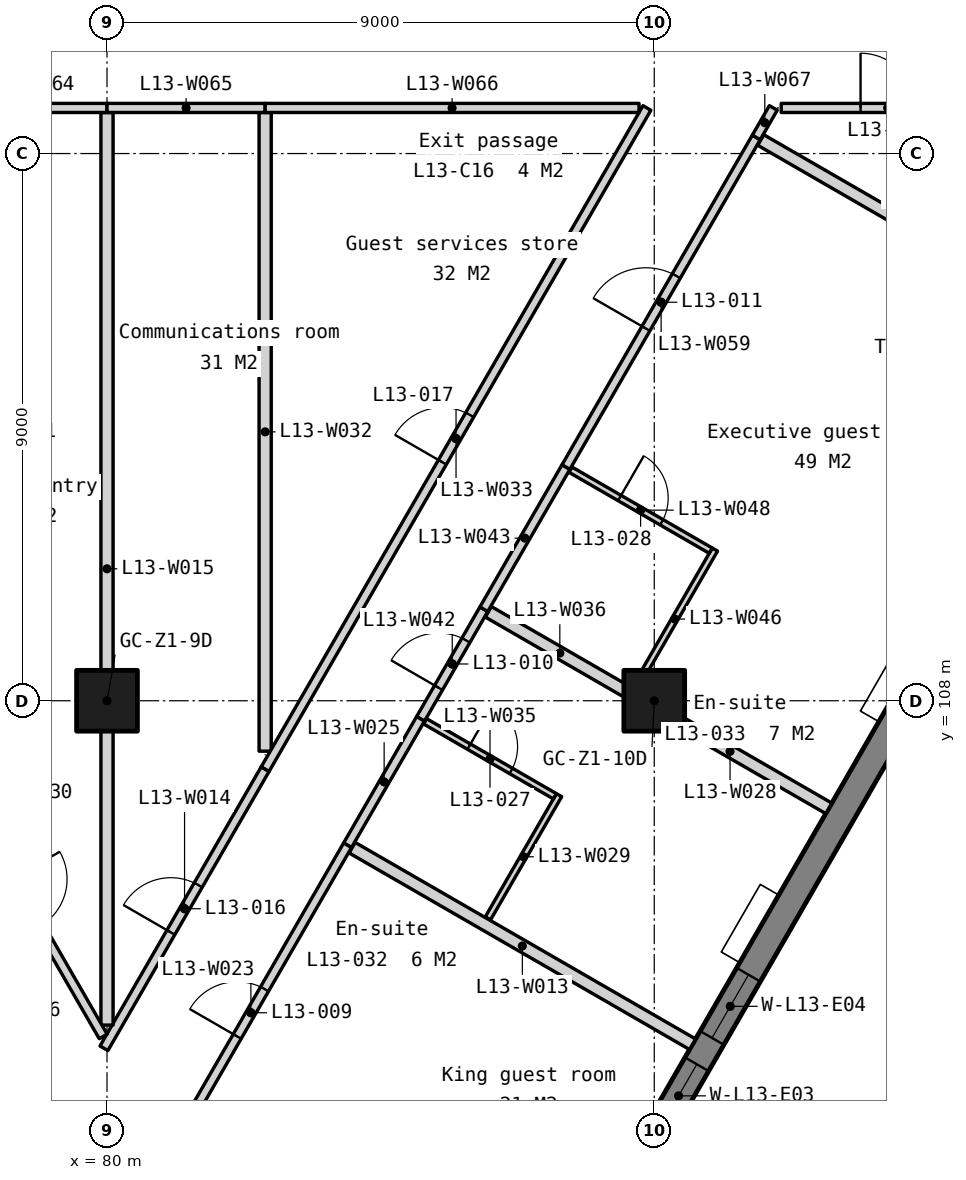
"""IFC4 building model, lengths in metres.
Left out: names, types, materials, properties, quantities, classifications, styles, units other than length and angle.
Written with IfcOpenShell. Run it as: python <this file> out.ifc"""

import sys

from ifc_helpers import new_model, si_unit, direction, frame, frame_2d, origin, origin_2d, place, context, subcontext, project, spatial, polyline, rectangle, outline, extrude, element, fill, save


model = new_model("IFC4")
c1 = context("Model", 3, precision=1e-05, world=origin(), true_north=direction((0.0, 1.0)))
c2 = subcontext(c1, "Body", "Model", "MODEL_VIEW")
j1 = project(units=[si_unit("LENGTHUNIT", "METRE"), si_unit("PLANEANGLEUNIT", "RADIAN")], contexts=[c1])
p1 = place(None, origin())
s1 = spatial("IfcSite", under=j1, at=p1, CompositionType="ELEMENT")
p2 = place(p1, origin())
s2 = spatial("IfcBuilding", under=s1, at=p2, CompositionType="ELEMENT")
p3 = place(p2, frame((0.0, 0.0, 59.5)))
s3 = spatial("IfcBuildingStorey", under=s2, at=p3, CompositionType="ELEMENT", Elevation=59.5)
for number, where, z_axis, x_axis in (
    (1, (80.0, 108.0, 0.0), (0.0, 0.0, 1.0), (1.0, 0.0, 0.0)),
    (2, (89.0, 108.0, 0.0), (0.0, 0.0, 1.0), (1.0, 0.0, 0.0)),
):
    element("IfcColumn", number, at=place(p3, frame(where, z_axis=z_axis, x_axis=x_axis)), inside=s3, PredefinedType="COLUMN", context=c2, shape_type="SweptSolid", body=[
        extrude(rectangle(XDim=1.0, YDim=1.0, at=origin_2d()), origin(), (0.0, 0.0, 1.0), 3.5),
    ])
p4 = place(p3, frame((83.105, 90.599, -0.15), z_axis=(0.0, 0.0, 1.0), x_axis=(0.499999201451, 0.866025864826, 0.0)))
e3 = element("IfcWall", 3, at=p4, inside=s3, PredefinedType="SOLIDWALL", context=c2, shape_type="SweptSolid", body=[
    extrude(outline(polyline([(44.8, 0.0), (44.8, 3.5), (0.0, 3.5), (0.0, 0.0), (44.8, 0.0)])), frame((0.0, 0.225, 0.0), z_axis=(0.0, -1.0, 0.0), x_axis=(1.0, 0.0, 0.0)), (0.0, 0.0, 1.0), 0.45),
])
p5 = place(p4, frame((3.03, 0.0, 1.05)))
e4 = element("IfcOpeningElement", 4, at=p5, cuts=e3, PredefinedType="OPENING", context=c2, shape_type="SweptSolid", body=[
    extrude(rectangle(XDim=1.2, YDim=1.5, at=frame_2d((0.6, 0.75))), frame((0.0, 0.235, 0.0), z_axis=(0.0, -1.0, 0.0), x_axis=(1.0, 0.0, 0.0)), (0.0, 0.0, 1.0), 0.47),
])
p6 = place(p4, frame((4.73, 0.0, 1.05)))
e5 = element("IfcOpeningElement", 5, at=p6, cuts=e3, PredefinedType="OPENING", context=c2, shape_type="SweptSolid", body=[
    extrude(rectangle(XDim=1.2, YDim=1.5, at=frame_2d((0.6, 0.75))), frame((0.0, 0.235, 0.0), z_axis=(0.0, -1.0, 0.0), x_axis=(1.0, 0.0, 0.0)), (0.0, 0.0, 1.0), 0.47),
])
p7 = place(p4, frame((11.99, 0.0, 1.05)))
e6 = element("IfcOpeningElement", 6, at=p7, cuts=e3, PredefinedType="OPENING", context=c2, shape_type="SweptSolid", body=[
    extrude(rectangle(XDim=1.2, YDim=1.5, at=frame_2d((0.6, 0.75))), frame((0.0, 0.235, 0.0), z_axis=(0.0, -1.0, 0.0), x_axis=(1.0, 0.0, 0.0)), (0.0, 0.0, 1.0), 0.47),
])
p8 = place(p4, frame((13.69, 0.0, 1.05)))
e7 = element("IfcOpeningElement", 7, at=p8, cuts=e3, PredefinedType="OPENING", context=c2, shape_type="SweptSolid", body=[
    extrude(rectangle(XDim=1.2, YDim=1.5, at=frame_2d((0.6, 0.75))), frame((0.0, 0.235, 0.0), z_axis=(0.0, -1.0, 0.0), x_axis=(1.0, 0.0, 0.0)), (0.0, 0.0, 1.0), 0.47),
])
p9 = place(p4, frame((20.95, 0.0, 1.05)))
e8 = element("IfcOpeningElement", 8, at=p9, cuts=e3, PredefinedType="OPENING", context=c2, shape_type="SweptSolid", body=[
    extrude(rectangle(XDim=1.2, YDim=1.5, at=frame_2d((0.6, 0.75))), frame((0.0, 0.235, 0.0), z_axis=(0.0, -1.0, 0.0), x_axis=(1.0, 0.0, 0.0)), (0.0, 0.0, 1.0), 0.47),
])
p10 = place(p4, frame((22.65, 0.0, 1.05)))
e9 = element("IfcOpeningElement", 9, at=p10, cuts=e3, PredefinedType="OPENING", context=c2, shape_type="SweptSolid", body=[
    extrude(rectangle(XDim=1.2, YDim=1.5, at=frame_2d((0.6, 0.75))), frame((0.0, 0.235, 0.0), z_axis=(0.0, -1.0, 0.0), x_axis=(1.0, 0.0, 0.0)), (0.0, 0.0, 1.0), 0.47),
])
p11 = place(p4, frame((29.91, 0.0, 1.05)))
e10 = element("IfcOpeningElement", 10, at=p11, cuts=e3, PredefinedType="OPENING", context=c2, shape_type="SweptSolid", body=[
    extrude(rectangle(XDim=1.2, YDim=1.5, at=frame_2d((0.6, 0.75))), frame((0.0, 0.235, 0.0), z_axis=(0.0, -1.0, 0.0), x_axis=(1.0, 0.0, 0.0)), (0.0, 0.0, 1.0), 0.47),
])
p12 = place(p4, frame((31.61, 0.0, 1.05)))
e11 = element("IfcOpeningElement", 11, at=p12, cuts=e3, PredefinedType="OPENING", context=c2, shape_type="SweptSolid", body=[
    extrude(rectangle(XDim=1.2, YDim=1.5, at=frame_2d((0.6, 0.75))), frame((0.0, 0.235, 0.0), z_axis=(0.0, -1.0, 0.0), x_axis=(1.0, 0.0, 0.0)), (0.0, 0.0, 1.0), 0.47),
])
p13 = place(p4, frame((38.87, 0.0, 1.05)))
e12 = element("IfcOpeningElement", 12, at=p13, cuts=e3, PredefinedType="OPENING", context=c2, shape_type="SweptSolid", body=[
    extrude(rectangle(XDim=1.2, YDim=1.5, at=frame_2d((0.6, 0.75))), frame((0.0, 0.235, 0.0), z_axis=(0.0, -1.0, 0.0), x_axis=(1.0, 0.0, 0.0)), (0.0, 0.0, 1.0), 0.47),
])
p14 = place(p4, frame((40.57, 0.0, 1.05)))
e13 = element("IfcOpeningElement", 13, at=p14, cuts=e3, PredefinedType="OPENING", context=c2, shape_type="SweptSolid", body=[
    extrude(rectangle(XDim=1.2, YDim=1.5, at=frame_2d((0.6, 0.75))), frame((0.0, 0.235, 0.0), z_axis=(0.0, -1.0, 0.0), x_axis=(1.0, 0.0, 0.0)), (0.0, 0.0, 1.0), 0.47),
])
p15 = place(p3, frame((76.042, 105.626, 0.0), z_axis=(0.0, 0.0, 1.0), x_axis=(0.499991405182, -0.866030365948, 0.0)))
e14 = element("IfcWall", 14, at=p15, inside=s3, PredefinedType="PARTITIONING", context=c2, shape_type="SweptSolid", body=[
    extrude(rectangle(XDim=6.496, YDim=0.15, at=frame_2d((3.248, 0.0))), origin(), (0.0, 0.0, 1.0), 3.35),
])
p16 = place(p15, frame((2.798, 0.0, 0.0)))
e15 = element("IfcOpeningElement", 15, at=p16, cuts=e14, PredefinedType="OPENING", context=c2, shape_type="SweptSolid", body=[
    extrude(rectangle(XDim=0.9, YDim=2.1, at=frame_2d((0.45, 1.05))), frame((0.0, 0.085, 0.0), z_axis=(0.0, -1.0, 0.0), x_axis=(1.0, 0.0, 0.0)), (0.0, 0.0, 1.0), 0.17),
])
p17 = place(p3, frame((84.031, 105.583, 0.0), z_axis=(0.0, 0.0, 1.0), x_axis=(0.866015162859, -0.500017737384, 0.0)))
e16 = element("IfcWall", 16, at=p17, inside=s3, PredefinedType="PARTITIONING", context=c2, shape_type="SweptSolid", body=[
    extrude(rectangle(XDim=6.465, YDim=0.2, at=frame_2d((3.232, 0.0))), origin(), (0.0, 0.0, 1.0), 3.35),
])
p18 = place(p3, frame((79.95, 102.284, 0.0), z_axis=(0.0, 0.0, 1.0), x_axis=(0.500026712466, 0.866009980786, 0.0)))
e17 = element("IfcWall", 17, at=p18, inside=s3, PredefinedType="PARTITIONING", context=c2, shape_type="SweptSolid", body=[
    extrude(rectangle(XDim=5.302, YDim=0.15, at=frame_2d((2.651, 0.0))), origin(), (0.0, 0.0, 1.0), 3.35),
])
p19 = place(p18, frame((2.201, 0.0, 0.0)))
e18 = element("IfcOpeningElement", 18, at=p19, cuts=e17, PredefinedType="OPENING", context=c2, shape_type="SweptSolid", body=[
    extrude(rectangle(XDim=0.9, YDim=2.1, at=frame_2d((0.45, 1.05))), frame((0.0, 0.085, 0.0), z_axis=(0.0, -1.0, 0.0), x_axis=(1.0, 0.0, 0.0)), (0.0, 0.0, 1.0), 0.17),
])
p20 = place(p3, frame((80.0, 102.666, 0.0), z_axis=(0.0, 0.0, 1.0), x_axis=(0.0, 1.0, 0.0)))
e19 = element("IfcWall", 19, at=p20, inside=s3, PredefinedType="PARTITIONING", context=c2, shape_type="SweptSolid", body=[
    extrude(rectangle(XDim=15.01, YDim=0.2, at=frame_2d((7.505, 0.0))), origin(), (0.0, 0.0, 1.0), 2.801),
])
p21 = place(p3, frame((80.775, 100.113, 0.0), z_axis=(0.0, 0.0, 1.0), x_axis=(0.5000079448, 0.866020816803, 0.0)))
e20 = element("IfcWall", 20, at=p21, inside=s3, PredefinedType="PARTITIONING", context=c2, shape_type="SweptSolid", body=[
    extrude(rectangle(XDim=6.366, YDim=0.15, at=frame_2d((3.183, 0.0))), origin(), (0.0, 0.0, 1.0), 3.35),
])
p22 = place(p21, frame((2.733, 0.0, 0.0)))
e21 = element("IfcOpeningElement", 21, at=p22, cuts=e20, PredefinedType="OPENING", context=c2, shape_type="SweptSolid", body=[
    extrude(rectangle(XDim=0.9, YDim=2.1, at=frame_2d((0.45, 1.05))), frame((0.0, 0.085, 0.0), z_axis=(0.0, -1.0, 0.0), x_axis=(1.0, 0.0, 0.0)), (0.0, 0.0, 1.0), 0.17),
])
p23 = place(p3, frame((83.958, 105.626, 0.0), z_axis=(0.0, 0.0, 1.0), x_axis=(0.500001309137, 0.866024647952, 0.0)))
e22 = element("IfcWall", 22, at=p23, inside=s3, PredefinedType="PARTITIONING", context=c2, shape_type="SweptSolid", body=[
    extrude(rectangle(XDim=2.4, YDim=0.15, at=frame_2d((1.2, 0.0))), origin(), (0.0, 0.0, 1.0), 3.35),
])
p24 = place(p3, frame((88.623, 108.105, 0.0), z_axis=(0.0, 0.0, 1.0), x_axis=(0.866022959057, -0.500004234368, 0.0)))
e23 = element("IfcWall", 23, at=p24, inside=s3, PredefinedType="PARTITIONING", context=c2, shape_type="SweptSolid", body=[
    extrude(rectangle(XDim=3.75, YDim=0.2, at=frame_2d((1.875, 0.0))), origin(), (0.0, 0.0, 1.0), 3.35),
])
p25 = place(p3, frame((86.264, 104.421, 0.0), z_axis=(0.0, 0.0, 1.0), x_axis=(0.500032503492, 0.866006637072, 0.0)))
e24 = element("IfcWall", 24, at=p25, inside=s3, PredefinedType="PARTITIONING", context=c2, shape_type="SweptSolid", body=[
    extrude(rectangle(XDim=2.34, YDim=0.1, at=frame_2d((1.17, 0.0))), origin(), (0.0, 0.0, 1.0), 3.35),
])
p26 = place(p3, frame((77.399, 106.875, 0.0), z_axis=(0.0, 0.0, 1.0), x_axis=(0.500017996867, -0.866015013039, 0.0)))
e25 = element("IfcWall", 25, at=p26, inside=s3, PredefinedType="PARTITIONING", context=c2, shape_type="SweptSolid", body=[
    extrude(rectangle(XDim=5.077, YDim=0.15, at=frame_2d((2.539, 0.0))), origin(), (0.0, 0.0, 1.0), 3.35),
])
p27 = place(p26, frame((2.088, 0.0, 0.0)))
e26 = element("IfcOpeningElement", 26, at=p27, cuts=e25, PredefinedType="OPENING", context=c2, shape_type="SweptSolid", body=[
    extrude(rectangle(XDim=0.9, YDim=2.1, at=frame_2d((0.45, 1.05))), frame((0.0, 0.085, 0.0), z_axis=(0.0, -1.0, 0.0), x_axis=(1.0, 0.0, 0.0)), (0.0, 0.0, 1.0), 0.17),
])
p28 = place(p3, frame((82.601, 107.171, 0.0), z_axis=(0.0, 0.0, 1.0), x_axis=(0.0, 1.0, 0.0)))
e27 = element("IfcWall", 27, at=p28, inside=s3, PredefinedType="PARTITIONING", context=c2, shape_type="SweptSolid", body=[
    extrude(rectangle(XDim=10.504, YDim=0.2, at=frame_2d((5.252, 0.0))), origin(), (0.0, 0.0, 1.0), 3.35),
])
p29 = place(p3, frame((82.601, 106.875, 0.0), z_axis=(0.0, 0.0, 1.0), x_axis=(0.499995104884, 0.866028229963, 0.0)))
e28 = element("IfcWall", 28, at=p29, inside=s3, PredefinedType="PARTITIONING", context=c2, shape_type="SweptSolid", body=[
    extrude(rectangle(XDim=12.557, YDim=0.15, at=frame_2d((6.278, 0.0))), origin(), (0.0, 0.0, 1.0), 3.35),
])
p30 = place(p29, frame((5.828, 0.0, 0.0)))
e29 = element("IfcOpeningElement", 29, at=p30, cuts=e28, PredefinedType="OPENING", context=c2, shape_type="SweptSolid", body=[
    extrude(rectangle(XDim=0.9, YDim=2.1, at=frame_2d((0.45, 1.05))), frame((0.0, 0.085, 0.0), z_axis=(0.0, -1.0, 0.0), x_axis=(1.0, 0.0, 0.0)), (0.0, 0.0, 1.0), 0.17),
])
p31 = place(p3, frame((85.231, 107.662, 0.0), z_axis=(0.0, 0.0, 1.0), x_axis=(0.866040446274, -0.499973944738, 0.0)))
e30 = element("IfcWall", 30, at=p31, inside=s3, PredefinedType="PARTITIONING", context=c2, shape_type="SweptSolid", body=[
    extrude(rectangle(XDim=2.465, YDim=0.1, at=frame_2d((1.232, 0.0))), origin(), (0.0, 0.0, 1.0), 3.35),
])
p32 = place(p31, frame((0.833, 0.0, 0.0)))
e31 = element("IfcOpeningElement", 31, at=p32, cuts=e30, PredefinedType="OPENING", context=c2, shape_type="SweptSolid", body=[
    extrude(rectangle(XDim=0.8, YDim=2.1, at=frame_2d((0.4, 1.05))), frame((0.0, 0.06, 0.0), z_axis=(0.0, -1.0, 0.0), x_axis=(1.0, 0.0, 0.0)), (0.0, 0.0, 1.0), 0.12),
])
p33 = place(p3, frame((86.271, 109.463, 0.0), z_axis=(0.0, 0.0, 1.0), x_axis=(0.866043331744, -0.499968946578, 0.0)))
e32 = element("IfcWall", 32, at=p33, inside=s3, PredefinedType="PARTITIONING", context=c2, shape_type="SweptSolid", body=[
    extrude(rectangle(XDim=2.715, YDim=0.2, at=frame_2d((1.357, 0.0))), origin(), (0.0, 0.0, 1.0), 3.35),
])
p34 = place(p3, frame((85.158, 107.704, 0.0), z_axis=(0.0, 0.0, 1.0), x_axis=(0.500027264788, 0.866009661879, 0.0)))
e33 = element("IfcWall", 33, at=p34, inside=s3, PredefinedType="PARTITIONING", context=c2, shape_type="SweptSolid", body=[
    extrude(rectangle(XDim=2.08, YDim=0.15, at=frame_2d((1.04, 0.0))), origin(), (0.0, 0.0, 1.0), 3.35),
])
p35 = place(p34, frame((0.59, 0.0, 0.0)))
e34 = element("IfcOpeningElement", 34, at=p35, cuts=e33, PredefinedType="OPENING", context=c2, shape_type="SweptSolid", body=[
    extrude(rectangle(XDim=0.9, YDim=2.1, at=frame_2d((0.45, 1.05))), frame((0.0, 0.085, 0.0), z_axis=(0.0, -1.0, 0.0), x_axis=(1.0, 0.0, 0.0)), (0.0, 0.0, 1.0), 0.17),
])
p36 = place(p3, frame((86.198, 109.505, 0.0), z_axis=(0.0, 0.0, 1.0), x_axis=(0.50000943426, 0.866019956843, 0.0)))
e35 = element("IfcWall", 35, at=p36, inside=s3, PredefinedType="PARTITIONING", context=c2, shape_type="SweptSolid", body=[
    extrude(rectangle(XDim=2.7, YDim=0.15, at=frame_2d((1.35, 0.0))), origin(), (0.0, 0.0, 1.0), 3.35),
])
p37 = place(p3, frame((88.678, 108.201, 0.0), z_axis=(0.0, 0.0, 1.0), x_axis=(0.500007957085, 0.86602080971, 0.0)))
e36 = element("IfcWall", 36, at=p37, inside=s3, PredefinedType="PARTITIONING", context=c2, shape_type="SweptSolid", body=[
    extrude(rectangle(XDim=2.64, YDim=0.1, at=frame_2d((1.32, 0.0))), origin(), (0.0, 0.0, 1.0), 3.35),
])
p38 = place(p3, frame((87.621, 111.801, 0.0), z_axis=(0.0, 0.0, 1.0), x_axis=(0.866036091453, -0.499981487958, 0.0)))
e37 = element("IfcWall", 37, at=p38, inside=s3, PredefinedType="PARTITIONING", context=c2, shape_type="SweptSolid", body=[
    extrude(rectangle(XDim=2.665, YDim=0.1, at=frame_2d((1.333, 0.0))), origin(), (0.0, 0.0, 1.0), 3.35),
])
p39 = place(p38, frame((0.933, 0.0, 0.0)))
e38 = element("IfcOpeningElement", 38, at=p39, cuts=e37, PredefinedType="OPENING", context=c2, shape_type="SweptSolid", body=[
    extrude(rectangle(XDim=0.8, YDim=2.1, at=frame_2d((0.4, 1.05))), frame((0.0, 0.06, 0.0), z_axis=(0.0, -1.0, 0.0), x_axis=(1.0, 0.0, 0.0)), (0.0, 0.0, 1.0), 0.12),
])
p40 = place(p3, frame((90.751, 117.223, 0.0), z_axis=(0.0, 0.0, 1.0), x_axis=(0.866015162859, -0.500017737384, 0.0)))
e39 = element("IfcWall", 39, at=p40, inside=s3, PredefinedType="PARTITIONING", context=c2, shape_type="SweptSolid", body=[
    extrude(rectangle(XDim=6.465, YDim=0.2, at=frame_2d((3.232, 0.0))), origin(), (0.0, 0.0, 1.0), 3.35),
])
p41 = place(p3, frame((87.548, 111.844, 0.0), z_axis=(0.0, 0.0, 1.0), x_axis=(0.499981277565, 0.866036212918, 0.0)))
e40 = element("IfcWall", 40, at=p41, inside=s3, PredefinedType="PARTITIONING", context=c2, shape_type="SweptSolid", body=[
    extrude(rectangle(XDim=6.26, YDim=0.15, at=frame_2d((3.13, 0.0))), origin(), (0.0, 0.0, 1.0), 3.35),
])
p42 = place(p41, frame((2.63, 0.0, 0.0)))
e41 = element("IfcOpeningElement", 41, at=p42, cuts=e40, PredefinedType="OPENING", context=c2, shape_type="SweptSolid", body=[
    extrude(rectangle(XDim=1.0, YDim=2.1, at=frame_2d((0.5, 1.05))), frame((0.0, 0.085, 0.0), z_axis=(0.0, -1.0, 0.0), x_axis=(1.0, 0.0, 0.0)), (0.0, 0.0, 1.0), 0.17),
])
for number, where, z_axis, x_axis in (
    (42, (77.399, 117.75, 0.0), (0.0, 0.0, 1.0), (1.0, 0.0, 0.0)),
    (43, (80.0, 117.75, 0.0), (0.0, 0.0, 1.0), (1.0, 0.0, 0.0)),
):
    element("IfcWall", number, at=place(p3, frame(where, z_axis=z_axis, x_axis=x_axis)), inside=s3, PredefinedType="PARTITIONING", context=c2, shape_type="SweptSolid", body=[
        extrude(rectangle(XDim=2.601, YDim=0.15, at=frame_2d((1.301, 0.0))), origin(), (0.0, 0.0, 1.0), 3.35),
    ])
p43 = place(p3, frame((82.601, 117.75, 0.0), z_axis=(0.0, 0.0, 1.0), x_axis=(1.0, 0.0, 0.0)))
e44 = element("IfcWall", 44, at=p43, inside=s3, PredefinedType="PARTITIONING", context=c2, shape_type="SweptSolid", body=[
    extrude(rectangle(XDim=6.148, YDim=0.15, at=frame_2d((3.074, 0.0))), origin(), (0.0, 0.0, 1.0), 3.35),
])
p44 = place(p3, frame((90.678, 117.265, 0.0), z_axis=(0.0, 0.0, 1.0), x_axis=(0.50012503653, 0.865953201874, 0.0)))
e45 = element("IfcWall", 45, at=p44, inside=s3, PredefinedType="PARTITIONING", context=c2, shape_type="SweptSolid", body=[
    extrude(rectangle(XDim=0.56, YDim=0.15, at=frame_2d((0.28, 0.0))), origin(), (0.0, 0.0, 1.0), 3.35),
])
p45 = place(p3, frame((91.088, 117.75, 0.0), z_axis=(0.0, 0.0, 1.0), x_axis=(1.0, 0.0, 0.0)))
e46 = element("IfcWall", 46, at=p45, inside=s3, PredefinedType="PARTITIONING", context=c2, shape_type="SweptSolid", body=[
    extrude(rectangle(XDim=3.51, YDim=0.15, at=frame_2d((1.755, 0.0))), origin(), (0.0, 0.0, 1.0), 3.35),
])
p46 = place(p45, frame((1.305, 0.0, 0.0)))
e47 = element("IfcOpeningElement", 47, at=p46, cuts=e46, PredefinedType="OPENING", context=c2, shape_type="SweptSolid", body=[
    extrude(rectangle(XDim=0.9, YDim=2.1, at=frame_2d((0.45, 1.05))), frame((0.0, 0.085, 0.0), z_axis=(0.0, -1.0, 0.0), x_axis=(1.0, 0.0, 0.0)), (0.0, 0.0, 1.0), 0.17),
])
p47 = place(p7, origin())
e48 = element("IfcWindow", 48, at=p47, inside=s3, PartitioningType="SINGLE_PANEL", PredefinedType="WINDOW", context=c2, shape_type="SweptSolid", body=[
    extrude(rectangle(XDim=1.2, YDim=1.5, at=frame_2d((0.6, 0.75))), frame((0.0, 0.03, 0.0), z_axis=(0.0, -1.0, 0.0), x_axis=(1.0, 0.0, 0.0)), (0.0, 0.0, 1.0), 0.06),
])
fill(e6, e48)
p48 = place(p8, origin())
e49 = element("IfcWindow", 49, at=p48, inside=s3, PartitioningType="SINGLE_PANEL", PredefinedType="WINDOW", context=c2, shape_type="SweptSolid", body=[
    extrude(rectangle(XDim=1.2, YDim=1.5, at=frame_2d((0.6, 0.75))), frame((0.0, 0.03, 0.0), z_axis=(0.0, -1.0, 0.0), x_axis=(1.0, 0.0, 0.0)), (0.0, 0.0, 1.0), 0.06),
])
fill(e7, e49)
p49 = place(p22, origin())
e50 = element("IfcDoor", 50, at=p49, inside=s3, OperationType="SINGLE_SWING_LEFT", PredefinedType="DOOR", context=c2, shape_type="SweptSolid", body=[
    extrude(rectangle(XDim=0.9, YDim=2.1, at=frame_2d((0.45, 1.05))), frame((0.0, 0.025, 0.0), z_axis=(0.0, -1.0, 0.0), x_axis=(1.0, 0.0, 0.0)), (0.0, 0.0, 1.0), 0.05),
])
fill(e21, e50)
p50 = place(p35, origin())
e51 = element("IfcDoor", 51, at=p50, inside=s3, OperationType="SINGLE_SWING_LEFT", PredefinedType="DOOR", context=c2, shape_type="SweptSolid", body=[
    extrude(rectangle(XDim=0.9, YDim=2.1, at=frame_2d((0.45, 1.05))), frame((0.0, 0.025, 0.0), z_axis=(0.0, -1.0, 0.0), x_axis=(1.0, 0.0, 0.0)), (0.0, 0.0, 1.0), 0.05),
])
fill(e34, e51)
p51 = place(p42, origin())
e52 = element("IfcDoor", 52, at=p51, inside=s3, OperationType="SINGLE_SWING_LEFT", PredefinedType="DOOR", context=c2, shape_type="SweptSolid", body=[
    extrude(rectangle(XDim=1.0, YDim=2.1, at=frame_2d((0.5, 1.05))), frame((0.0, 0.025, 0.0), z_axis=(0.0, -1.0, 0.0), x_axis=(1.0, 0.0, 0.0)), (0.0, 0.0, 1.0), 0.05),
])
fill(e41, e52)
p52 = place(p46, origin())
e53 = element("IfcDoor", 53, at=p52, inside=s3, OperationType="SINGLE_SWING_LEFT", PredefinedType="DOOR", context=c2, shape_type="SweptSolid", body=[
    extrude(rectangle(XDim=0.9, YDim=2.1, at=frame_2d((0.45, 1.05))), frame((0.0, 0.025, 0.0), z_axis=(0.0, -1.0, 0.0), x_axis=(1.0, 0.0, 0.0)), (0.0, 0.0, 1.0), 0.05),
])
fill(e47, e53)
p53 = place(p19, origin())
e54 = element("IfcDoor", 54, at=p53, inside=s3, OperationType="SINGLE_SWING_LEFT", PredefinedType="DOOR", context=c2, shape_type="SweptSolid", body=[
    extrude(rectangle(XDim=0.9, YDim=2.1, at=frame_2d((0.45, 1.05))), frame((0.0, 0.025, 0.0), z_axis=(0.0, -1.0, 0.0), x_axis=(1.0, 0.0, 0.0)), (0.0, 0.0, 1.0), 0.05),
])
fill(e18, e54)
p54 = place(p30, origin())
e55 = element("IfcDoor", 55, at=p54, inside=s3, OperationType="SINGLE_SWING_LEFT", PredefinedType="DOOR", context=c2, shape_type="SweptSolid", body=[
    extrude(rectangle(XDim=0.9, YDim=2.1, at=frame_2d((0.45, 1.05))), frame((0.0, 0.025, 0.0), z_axis=(0.0, -1.0, 0.0), x_axis=(1.0, 0.0, 0.0)), (0.0, 0.0, 1.0), 0.05),
])
fill(e29, e55)
p55 = place(p32, origin())
e56 = element("IfcDoor", 56, at=p55, inside=s3, OperationType="SINGLE_SWING_LEFT", PredefinedType="DOOR", context=c2, shape_type="SweptSolid", body=[
    extrude(rectangle(XDim=0.8, YDim=2.1, at=frame_2d((0.4, 1.05))), frame((0.0, 0.025, 0.0), z_axis=(0.0, -1.0, 0.0), x_axis=(1.0, 0.0, 0.0)), (0.0, 0.0, 1.0), 0.05),
])
fill(e31, e56)
p56 = place(p39, origin())
e57 = element("IfcDoor", 57, at=p56, inside=s3, OperationType="SINGLE_SWING_LEFT", PredefinedType="DOOR", context=c2, shape_type="SweptSolid", body=[
    extrude(rectangle(XDim=0.8, YDim=2.1, at=frame_2d((0.4, 1.05))), frame((0.0, 0.025, 0.0), z_axis=(0.0, -1.0, 0.0), x_axis=(1.0, 0.0, 0.0)), (0.0, 0.0, 1.0), 0.05),
])
fill(e38, e57)
save(model, sys.argv[1])
